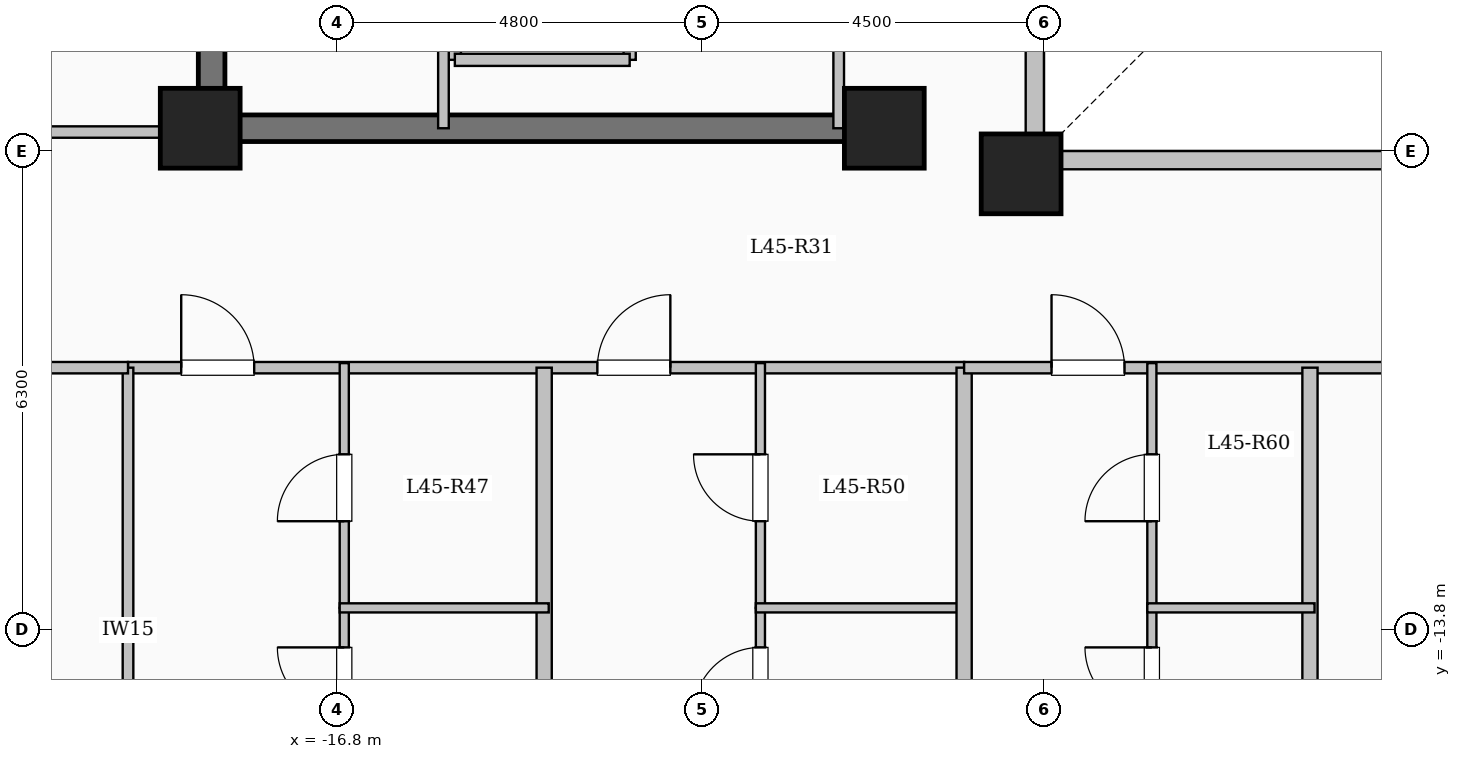
"""IFC4 building model, lengths in metres.
Left out: names, types, materials, properties, quantities, classifications, styles, units other than length and angle.
Written with IfcOpenShell. Run it as: python <this file> out.ifc"""

import sys

from ifc_helpers import new_model, si_unit, direction, frame, frame_2d, origin, origin_2d, place, context, subcontext, project, spatial, rectangle, extrude, element, fill, save


model = new_model("IFC4")
c1 = context("Model", 3, precision=1e-05, world=origin(), true_north=direction((0.0, 1.0)))
c2 = subcontext(c1, "Body", "Model", "MODEL_VIEW")
j1 = project(units=[si_unit("LENGTHUNIT", "METRE"), si_unit("PLANEANGLEUNIT", "RADIAN")], contexts=[c1])
p1 = place(None, origin())
s1 = spatial("IfcSite", under=j1, at=p1, CompositionType="ELEMENT")
p2 = place(p1, origin())
s2 = spatial("IfcBuilding", under=s1, at=p2, CompositionType="ELEMENT")
p3 = place(p2, frame((0.0, 0.0, 166.1)))
s3 = spatial("IfcBuildingStorey", under=s2, at=p3, CompositionType="ELEMENT", Elevation=166.1)
for number, where, z_axis, x_axis in (
    (1, (-7.8, -7.8, 0.0), (0.0, 0.0, 1.0), (1.0, 0.0, 0.0)),
    (2, (-9.6, -7.2, 0.0), (0.0, 0.0, 1.0), (1.0, 0.0, 0.0)),
    (3, (-18.6, -7.2, 0.0), (0.0, 0.0, 1.0), (1.0, 0.0, 0.0)),
):
    element("IfcColumn", number, at=place(p3, frame(where, z_axis=z_axis, x_axis=x_axis)), inside=s3, PredefinedType="COLUMN", context=c2, shape_type="SweptSolid", body=[
        extrude(rectangle(XDim=1.05, YDim=1.05, at=origin_2d()), origin(), (0.0, 0.0, 1.0), 3.35),
    ])
p4 = place(p3, frame((-7.62, -7.62, 0.0), z_axis=(0.0, 0.0, 1.0), x_axis=(1.0, 0.0, 0.0)))
e4 = element("IfcWall", 4, at=p4, inside=s3, PredefinedType="SOLIDWALL", context=c2, shape_type="SweptSolid", body=[
    extrude(rectangle(XDim=15.24, YDim=0.24, at=frame_2d((7.62, 0.0))), origin(), (0.0, 0.0, 1.0), 3.1),
])
p5 = place(p4, frame((6.92, 0.0, 0.95)))
e5 = element("IfcOpeningElement", 5, at=p5, cuts=e4, PredefinedType="OPENING", context=c2, shape_type="SweptSolid", body=[
    extrude(rectangle(XDim=1.4, YDim=1.5, at=frame_2d((0.7, 0.75))), frame((0.0, 0.13, 0.0), z_axis=(0.0, -1.0, 0.0), x_axis=(1.0, 0.0, 0.0)), (0.0, 0.0, 1.0), 0.26),
])
p6 = place(p3, frame((-7.62, 7.62, 0.0), z_axis=(0.0, 0.0, 1.0), x_axis=(0.0, -1.0, 0.0)))
e6 = element("IfcWall", 6, at=p6, inside=s3, PredefinedType="SOLIDWALL", context=c2, shape_type="SweptSolid", body=[
    extrude(rectangle(XDim=15.24, YDim=0.24, at=frame_2d((7.62, 0.0))), origin(), (0.0, 0.0, 1.0), 3.1),
])
p7 = place(p6, frame((6.92, 0.0, 0.95)))
e7 = element("IfcOpeningElement", 7, at=p7, cuts=e6, PredefinedType="OPENING", context=c2, shape_type="SweptSolid", body=[
    extrude(rectangle(XDim=1.4, YDim=1.5, at=frame_2d((0.7, 0.75))), frame((0.0, 0.13, 0.0), z_axis=(0.0, -1.0, 0.0), x_axis=(1.0, 0.0, 0.0)), (0.0, 0.0, 1.0), 0.26),
])
for number, where, z_axis, x_axis in (
    (8, (-15.25, -6.3, 0.0), (0.0, 0.0, 1.0), (0.0, 1.0, 0.0)),
    (9, (-12.95, -6.3, 0.0), (0.0, 0.0, 1.0), (0.0, 1.0, 0.0)),
):
    element("IfcWall", number, at=place(p3, frame(where, z_axis=z_axis, x_axis=x_axis)), inside=s3, PredefinedType="SOLIDWALL", context=c2, shape_type="SweptSolid", body=[
        extrude(rectangle(XDim=2.6, YDim=0.16, at=frame_2d((1.3, 0.0))), origin(), (0.0, 0.0, 1.0), 3.1),
    ])
p8 = place(p3, frame((-15.25, -6.3, 0.0), z_axis=(0.0, 0.0, 1.0), x_axis=(1.0, 0.0, 0.0)))
e10 = element("IfcWall", 10, at=p8, inside=s3, PredefinedType="SOLIDWALL", context=c2, shape_type="SweptSolid", body=[
    extrude(rectangle(XDim=2.3, YDim=0.16, at=frame_2d((1.15, 0.0))), origin(), (0.0, 0.0, 1.0), 3.1),
])
p9 = place(p3, frame((-18.45, -7.375, 0.0), z_axis=(0.0, 0.0, 1.0), x_axis=(0.0, 1.0, 0.0)))
e11 = element("IfcWall", 11, at=p9, inside=s3, PredefinedType="SHEAR", context=c2, shape_type="SweptSolid", body=[
    extrude(rectangle(XDim=14.05, YDim=0.35, at=frame_2d((7.025, 0.0))), origin(), (0.0, 0.0, 1.0), 3.35),
])
p10 = place(p3, frame((-18.625, -7.2, 0.0), z_axis=(0.0, 0.0, 1.0), x_axis=(1.0, 0.0, 0.0)))
e12 = element("IfcWall", 12, at=p10, inside=s3, PredefinedType="SHEAR", context=c2, shape_type="SweptSolid", body=[
    extrude(rectangle(XDim=8.55, YDim=0.35, at=frame_2d((4.275, 0.0))), origin(), (0.0, 0.0, 1.0), 3.35),
])
p11 = place(p3, frame((-15.4, -7.2, 0.0), z_axis=(0.0, 0.0, 1.0), x_axis=(0.0, 1.0, 0.0)))
e13 = element("IfcWall", 13, at=p11, inside=s3, PredefinedType="PARTITIONING", context=c2, shape_type="SweptSolid", body=[
    extrude(rectangle(XDim=10.45, YDim=0.14, at=frame_2d((5.225, 0.0))), origin(), (0.0, 0.0, 1.0), 3.1),
])
p12 = place(p11, frame((9.25, 0.0, 0.0)))
e14 = element("IfcOpeningElement", 14, at=p12, cuts=e13, PredefinedType="OPENING", context=c2, shape_type="SweptSolid", body=[
    extrude(rectangle(XDim=0.9, YDim=2.08, at=frame_2d((0.45, 1.04))), frame((0.0, 0.08, 0.0), z_axis=(0.0, -1.0, 0.0), x_axis=(1.0, 0.0, 0.0)), (0.0, 0.0, 1.0), 0.16),
])
p13 = place(p3, frame((-10.2, -7.2, 0.0), z_axis=(0.0, 0.0, 1.0), x_axis=(0.0, 1.0, 0.0)))
e15 = element("IfcWall", 15, at=p13, inside=s3, PredefinedType="PARTITIONING", context=c2, shape_type="SweptSolid", body=[
    extrude(rectangle(XDim=9.12, YDim=0.14, at=frame_2d((4.56, 0.0))), origin(), (0.0, 0.0, 1.0), 3.1),
])
p14 = place(p13, frame((1.9, 0.0, 0.0)))
e16 = element("IfcOpeningElement", 16, at=p14, cuts=e15, PredefinedType="OPENING", context=c2, shape_type="SweptSolid", body=[
    extrude(rectangle(XDim=0.95, YDim=2.12, at=frame_2d((0.475, 1.06))), frame((0.0, 0.08, 0.0), z_axis=(0.0, -1.0, 0.0), x_axis=(1.0, 0.0, 0.0)), (0.0, 0.0, 1.0), 0.16),
])
p15 = place(p13, frame((5.8, 0.0, 0.0)))
e17 = element("IfcOpeningElement", 17, at=p15, cuts=e15, PredefinedType="OPENING", context=c2, shape_type="SweptSolid", body=[
    extrude(rectangle(XDim=0.95, YDim=2.12, at=frame_2d((0.475, 1.06))), frame((0.0, 0.08, 0.0), z_axis=(0.0, -1.0, 0.0), x_axis=(1.0, 0.0, 0.0)), (0.0, 0.0, 1.0), 0.16),
])
p16 = place(p3, frame((-19.55, -10.35, 0.0), z_axis=(0.0, 0.0, 1.0), x_axis=(1.0, 0.0, 0.0)))
e18 = element("IfcWall", 18, at=p16, inside=s3, PredefinedType="PARTITIONING", context=c2, shape_type="SweptSolid", body=[
    extrude(rectangle(XDim=11.0, YDim=0.15, at=frame_2d((5.5, 0.0))), origin(), (0.0, 0.0, 1.0), 3.1),
])
p17 = place(p16, frame((0.7, 0.0, 0.0)))
e19 = element("IfcOpeningElement", 19, at=p17, cuts=e18, PredefinedType="OPENING", context=c2, shape_type="SweptSolid", body=[
    extrude(rectangle(XDim=0.96, YDim=2.15, at=frame_2d((0.48, 1.075))), frame((0.0, 0.085, 0.0), z_axis=(0.0, -1.0, 0.0), x_axis=(1.0, 0.0, 0.0)), (0.0, 0.0, 1.0), 0.17),
])
p18 = place(p16, frame((6.175, 0.0, 0.0)))
e20 = element("IfcOpeningElement", 20, at=p18, cuts=e18, PredefinedType="OPENING", context=c2, shape_type="SweptSolid", body=[
    extrude(rectangle(XDim=0.96, YDim=2.15, at=frame_2d((0.48, 1.075))), frame((0.0, 0.085, 0.0), z_axis=(0.0, -1.0, 0.0), x_axis=(1.0, 0.0, 0.0)), (0.0, 0.0, 1.0), 0.17),
])
p19 = place(p3, frame((-14.075, -21.2, 0.0), z_axis=(0.0, 0.0, 1.0), x_axis=(0.0, 1.0, 0.0)))
e21 = element("IfcWall", 21, at=p19, inside=s3, PredefinedType="SOLIDWALL", context=c2, shape_type="SweptSolid", body=[
    extrude(rectangle(XDim=10.85, YDim=0.2, at=frame_2d((5.425, 0.0))), origin(), (0.0, 0.0, 1.0), 3.1),
])
p20 = place(p3, frame((-16.705, -21.2, 0.0), z_axis=(0.0, 0.0, 1.0), x_axis=(0.0, 1.0, 0.0)))
e22 = element("IfcWall", 22, at=p20, inside=s3, PredefinedType="PARTITIONING", context=c2, shape_type="SweptSolid", body=[
    extrude(rectangle(XDim=7.69, YDim=0.12, at=frame_2d((3.845, 0.0))), origin(), (0.0, 0.0, 1.0), 3.1),
])
p21 = place(p20, frame((6.29, 0.0, 0.0)))
e23 = element("IfcOpeningElement", 23, at=p21, cuts=e22, PredefinedType="OPENING", context=c2, shape_type="SweptSolid", body=[
    extrude(rectangle(XDim=0.88, YDim=2.1, at=frame_2d((0.44, 1.05))), frame((0.0, 0.07, 0.0), z_axis=(0.0, -1.0, 0.0), x_axis=(1.0, 0.0, 0.0)), (0.0, 0.0, 1.0), 0.14),
])
p22 = place(p3, frame((-16.705, -13.51, 0.0), z_axis=(0.0, 0.0, 1.0), x_axis=(0.0, 1.0, 0.0)))
e24 = element("IfcWall", 24, at=p22, inside=s3, PredefinedType="PARTITIONING", context=c2, shape_type="SweptSolid", body=[
    extrude(rectangle(XDim=3.22, YDim=0.12, at=frame_2d((1.61, 0.0))), origin(), (0.0, 0.0, 1.0), 3.1),
])
p23 = place(p22, frame((1.14, 0.0, 0.0)))
e25 = element("IfcOpeningElement", 25, at=p23, cuts=e24, PredefinedType="OPENING", context=c2, shape_type="SweptSolid", body=[
    extrude(rectangle(XDim=0.88, YDim=2.1, at=frame_2d((0.44, 1.05))), frame((0.0, 0.07, 0.0), z_axis=(0.0, -1.0, 0.0), x_axis=(1.0, 0.0, 0.0)), (0.0, 0.0, 1.0), 0.14),
])
p24 = place(p3, frame((-16.765, -13.51, 0.0), z_axis=(0.0, 0.0, 1.0), x_axis=(1.0, 0.0, 0.0)))
e26 = element("IfcWall", 26, at=p24, inside=s3, PredefinedType="PARTITIONING", context=c2, shape_type="SweptSolid", body=[
    extrude(rectangle(XDim=2.75, YDim=0.12, at=frame_2d((1.375, 0.0))), origin(), (0.0, 0.0, 1.0), 3.1),
])
p25 = place(p3, frame((-11.23, -21.2, 0.0), z_axis=(0.0, 0.0, 1.0), x_axis=(0.0, 1.0, 0.0)))
e27 = element("IfcWall", 27, at=p25, inside=s3, PredefinedType="PARTITIONING", context=c2, shape_type="SweptSolid", body=[
    extrude(rectangle(XDim=7.69, YDim=0.12, at=frame_2d((3.845, 0.0))), origin(), (0.0, 0.0, 1.0), 3.1),
])
p26 = place(p25, frame((6.29, 0.0, 0.0)))
e28 = element("IfcOpeningElement", 28, at=p26, cuts=e27, PredefinedType="OPENING", context=c2, shape_type="SweptSolid", body=[
    extrude(rectangle(XDim=0.88, YDim=2.1, at=frame_2d((0.44, 1.05))), frame((0.0, 0.07, 0.0), z_axis=(0.0, -1.0, 0.0), x_axis=(1.0, 0.0, 0.0)), (0.0, 0.0, 1.0), 0.14),
])
p27 = place(p3, frame((-11.23, -13.51, 0.0), z_axis=(0.0, 0.0, 1.0), x_axis=(0.0, 1.0, 0.0)))
e29 = element("IfcWall", 29, at=p27, inside=s3, PredefinedType="PARTITIONING", context=c2, shape_type="SweptSolid", body=[
    extrude(rectangle(XDim=3.22, YDim=0.12, at=frame_2d((1.61, 0.0))), origin(), (0.0, 0.0, 1.0), 3.1),
])
p28 = place(p27, frame((1.14, 0.0, 0.0)))
e30 = element("IfcOpeningElement", 30, at=p28, cuts=e29, PredefinedType="OPENING", context=c2, shape_type="SweptSolid", body=[
    extrude(rectangle(XDim=0.88, YDim=2.1, at=frame_2d((0.44, 1.05))), frame((0.0, 0.07, 0.0), z_axis=(0.0, -1.0, 0.0), x_axis=(1.0, 0.0, 0.0)), (0.0, 0.0, 1.0), 0.14),
])
p29 = place(p3, frame((-11.29, -13.51, 0.0), z_axis=(0.0, 0.0, 1.0), x_axis=(1.0, 0.0, 0.0)))
e31 = element("IfcWall", 31, at=p29, inside=s3, PredefinedType="PARTITIONING", context=c2, shape_type="SweptSolid", body=[
    extrude(rectangle(XDim=2.75, YDim=0.12, at=frame_2d((1.375, 0.0))), origin(), (0.0, 0.0, 1.0), 3.1),
])
p30 = place(p3, frame((-8.55, -21.804, 0.0), z_axis=(0.0, 0.0, 1.0), x_axis=(0.0, 1.0, 0.0)))
e32 = element("IfcWall", 32, at=p30, inside=s3, PredefinedType="SOLIDWALL", context=c2, shape_type="SweptSolid", body=[
    extrude(rectangle(XDim=11.454, YDim=0.2, at=frame_2d((5.727, 0.0))), origin(), (0.0, 0.0, 1.0), 3.1),
])
p31 = place(p3, frame((-8.55, -10.35, 0.0), z_axis=(0.0, 0.0, 1.0), x_axis=(1.0, 0.0, 0.0)))
e33 = element("IfcWall", 33, at=p31, inside=s3, PredefinedType="PARTITIONING", context=c2, shape_type="SweptSolid", body=[
    extrude(rectangle(XDim=17.1, YDim=0.15, at=frame_2d((8.55, 0.0))), origin(), (0.0, 0.0, 1.0), 3.1),
])
p32 = place(p31, frame((1.15, 0.0, 0.0)))
e34 = element("IfcOpeningElement", 34, at=p32, cuts=e33, PredefinedType="OPENING", context=c2, shape_type="SweptSolid", body=[
    extrude(rectangle(XDim=0.96, YDim=2.15, at=frame_2d((0.48, 1.075))), frame((0.0, 0.085, 0.0), z_axis=(0.0, -1.0, 0.0), x_axis=(1.0, 0.0, 0.0)), (0.0, 0.0, 1.0), 0.17),
])
p33 = place(p31, frame((10.5, 0.0, 0.0)))
e35 = element("IfcOpeningElement", 35, at=p33, cuts=e33, PredefinedType="OPENING", context=c2, shape_type="SweptSolid", body=[
    extrude(rectangle(XDim=0.96, YDim=2.15, at=frame_2d((0.48, 1.075))), frame((0.0, 0.085, 0.0), z_axis=(0.0, -1.0, 0.0), x_axis=(1.0, 0.0, 0.0)), (0.0, 0.0, 1.0), 0.17),
])
p34 = place(p3, frame((-4.0, -21.15, 0.0), z_axis=(0.0, 0.0, 1.0), x_axis=(0.0, 1.0, 0.0)))
e36 = element("IfcWall", 36, at=p34, inside=s3, PredefinedType="SOLIDWALL", context=c2, shape_type="SweptSolid", body=[
    extrude(rectangle(XDim=10.8, YDim=0.2, at=frame_2d((5.4, 0.0))), origin(), (0.0, 0.0, 1.0), 3.1),
])
p35 = place(p3, frame((-6.08, -22.414, 0.0), z_axis=(0.0, 0.0, 1.0), x_axis=(0.0, 1.0, 0.0)))
e37 = element("IfcWall", 37, at=p35, inside=s3, PredefinedType="PARTITIONING", context=c2, shape_type="SweptSolid", body=[
    extrude(rectangle(XDim=8.904, YDim=0.12, at=frame_2d((4.452, 0.0))), origin(), (0.0, 0.0, 1.0), 3.1),
])
p36 = place(p35, frame((7.504, 0.0, 0.0)))
e38 = element("IfcOpeningElement", 38, at=p36, cuts=e37, PredefinedType="OPENING", context=c2, shape_type="SweptSolid", body=[
    extrude(rectangle(XDim=0.88, YDim=2.1, at=frame_2d((0.44, 1.05))), frame((0.0, 0.07, 0.0), z_axis=(0.0, -1.0, 0.0), x_axis=(1.0, 0.0, 0.0)), (0.0, 0.0, 1.0), 0.14),
])
p37 = place(p3, frame((-6.08, -13.51, 0.0), z_axis=(0.0, 0.0, 1.0), x_axis=(0.0, 1.0, 0.0)))
e39 = element("IfcWall", 39, at=p37, inside=s3, PredefinedType="PARTITIONING", context=c2, shape_type="SweptSolid", body=[
    extrude(rectangle(XDim=3.22, YDim=0.12, at=frame_2d((1.61, 0.0))), origin(), (0.0, 0.0, 1.0), 3.1),
])
p38 = place(p37, frame((1.14, 0.0, 0.0)))
e40 = element("IfcOpeningElement", 40, at=p38, cuts=e39, PredefinedType="OPENING", context=c2, shape_type="SweptSolid", body=[
    extrude(rectangle(XDim=0.88, YDim=2.1, at=frame_2d((0.44, 1.05))), frame((0.0, 0.07, 0.0), z_axis=(0.0, -1.0, 0.0), x_axis=(1.0, 0.0, 0.0)), (0.0, 0.0, 1.0), 0.14),
])
p39 = place(p3, frame((-6.14, -13.51, 0.0), z_axis=(0.0, 0.0, 1.0), x_axis=(1.0, 0.0, 0.0)))
e41 = element("IfcWall", 41, at=p39, inside=s3, PredefinedType="PARTITIONING", context=c2, shape_type="SweptSolid", body=[
    extrude(rectangle(XDim=2.2, YDim=0.12, at=frame_2d((1.1, 0.0))), origin(), (0.0, 0.0, 1.0), 3.1),
])
p40 = place(p3, frame((-25.08, -7.25, 0.0), z_axis=(0.0, 0.0, 1.0), x_axis=(1.0, 0.0, 0.0)))
e42 = element("IfcWall", 42, at=p40, inside=s3, PredefinedType="PARTITIONING", context=c2, shape_type="SweptSolid", body=[
    extrude(rectangle(XDim=6.63, YDim=0.15, at=frame_2d((3.315, 0.0))), origin(), (0.0, 0.0, 1.0), 3.1),
])
p41 = place(p40, frame((3.53, 0.0, 0.0)))
e43 = element("IfcOpeningElement", 43, at=p41, cuts=e42, PredefinedType="OPENING", context=c2, shape_type="SweptSolid", body=[
    extrude(rectangle(XDim=0.96, YDim=2.15, at=frame_2d((0.48, 1.075))), frame((0.0, 0.085, 0.0), z_axis=(0.0, -1.0, 0.0), x_axis=(1.0, 0.0, 0.0)), (0.0, 0.0, 1.0), 0.17),
])
p42 = place(p3, frame((-19.55, -17.25, 0.0), z_axis=(0.0, 0.0, 1.0), x_axis=(0.0, 1.0, 0.0)))
e44 = element("IfcWall", 44, at=p42, inside=s3, PredefinedType="PARTITIONING", context=c2, shape_type="SweptSolid", body=[
    extrude(rectangle(XDim=6.9, YDim=0.14, at=frame_2d((3.45, 0.0))), origin(), (0.0, 0.0, 1.0), 3.1),
])
p43 = place(p3, frame((-25.08, -10.35, 0.0), z_axis=(0.0, 0.0, 1.0), x_axis=(1.0, 0.0, 0.0)))
e45 = element("IfcWall", 45, at=p43, inside=s3, PredefinedType="PARTITIONING", context=c2, shape_type="SweptSolid", body=[
    extrude(rectangle(XDim=5.53, YDim=0.15, at=frame_2d((2.765, 0.0))), origin(), (0.0, 0.0, 1.0), 3.1),
])
p44 = place(p43, frame((2.29, 0.0, 0.0)))
e46 = element("IfcOpeningElement", 46, at=p44, cuts=e45, PredefinedType="OPENING", context=c2, shape_type="SweptSolid", body=[
    extrude(rectangle(XDim=0.95, YDim=2.15, at=frame_2d((0.475, 1.075))), frame((0.0, 0.085, 0.0), z_axis=(0.0, -1.0, 0.0), x_axis=(1.0, 0.0, 0.0)), (0.0, 0.0, 1.0), 0.17),
])
p45 = place(p17, origin())
e47 = element("IfcDoor", 47, at=p45, inside=s3, OperationType="SINGLE_SWING_LEFT", PredefinedType="DOOR", context=c2, shape_type="SweptSolid", body=[
    extrude(rectangle(XDim=0.96, YDim=2.15, at=frame_2d((0.48, 1.075))), frame((0.0, 0.025, 0.0), z_axis=(0.0, -1.0, 0.0), x_axis=(1.0, 0.0, 0.0)), (0.0, 0.0, 1.0), 0.05),
])
fill(e19, e47)
p46 = place(p21, origin())
e48 = element("IfcDoor", 48, at=p46, inside=s3, OperationType="SINGLE_SWING_RIGHT", PredefinedType="DOOR", context=c2, shape_type="SweptSolid", body=[
    extrude(rectangle(XDim=0.88, YDim=2.1, at=frame_2d((0.44, 1.05))), frame((0.0, 0.025, 0.0), z_axis=(0.0, -1.0, 0.0), x_axis=(1.0, 0.0, 0.0)), (0.0, 0.0, 1.0), 0.05),
])
fill(e23, e48)
p47 = place(p23, origin())
e49 = element("IfcDoor", 49, at=p47, inside=s3, OperationType="SINGLE_SWING_LEFT", PredefinedType="DOOR", context=c2, shape_type="SweptSolid", body=[
    extrude(rectangle(XDim=0.88, YDim=2.1, at=frame_2d((0.44, 1.05))), frame((0.0, 0.025, 0.0), z_axis=(0.0, -1.0, 0.0), x_axis=(1.0, 0.0, 0.0)), (0.0, 0.0, 1.0), 0.05),
])
fill(e25, e49)
p48 = place(p18, origin())
e50 = element("IfcDoor", 50, at=p48, inside=s3, OperationType="SINGLE_SWING_RIGHT", PredefinedType="DOOR", context=c2, shape_type="SweptSolid", body=[
    extrude(rectangle(XDim=0.96, YDim=2.15, at=frame_2d((0.48, 1.075))), frame((0.0, 0.025, 0.0), z_axis=(0.0, -1.0, 0.0), x_axis=(1.0, 0.0, 0.0)), (0.0, 0.0, 1.0), 0.05),
])
fill(e20, e50)
p49 = place(p26, origin())
e51 = element("IfcDoor", 51, at=p49, inside=s3, OperationType="SINGLE_SWING_LEFT", PredefinedType="DOOR", context=c2, shape_type="SweptSolid", body=[
    extrude(rectangle(XDim=0.88, YDim=2.1, at=frame_2d((0.44, 1.05))), frame((0.0, 0.025, 0.0), z_axis=(0.0, -1.0, 0.0), x_axis=(1.0, 0.0, 0.0)), (0.0, 0.0, 1.0), 0.05),
])
fill(e28, e51)
p50 = place(p28, origin())
e52 = element("IfcDoor", 52, at=p50, inside=s3, OperationType="SINGLE_SWING_RIGHT", PredefinedType="DOOR", context=c2, shape_type="SweptSolid", body=[
    extrude(rectangle(XDim=0.88, YDim=2.1, at=frame_2d((0.44, 1.05))), frame((0.0, 0.025, 0.0), z_axis=(0.0, -1.0, 0.0), x_axis=(1.0, 0.0, 0.0)), (0.0, 0.0, 1.0), 0.05),
])
fill(e30, e52)
p51 = place(p32, origin())
e53 = element("IfcDoor", 53, at=p51, inside=s3, OperationType="SINGLE_SWING_LEFT", PredefinedType="DOOR", context=c2, shape_type="SweptSolid", body=[
    extrude(rectangle(XDim=0.96, YDim=2.15, at=frame_2d((0.48, 1.075))), frame((0.0, 0.025, 0.0), z_axis=(0.0, -1.0, 0.0), x_axis=(1.0, 0.0, 0.0)), (0.0, 0.0, 1.0), 0.05),
])
fill(e34, e53)
p52 = place(p36, origin())
e54 = element("IfcDoor", 54, at=p52, inside=s3, OperationType="SINGLE_SWING_RIGHT", PredefinedType="DOOR", context=c2, shape_type="SweptSolid", body=[
    extrude(rectangle(XDim=0.88, YDim=2.1, at=frame_2d((0.44, 1.05))), frame((0.0, 0.025, 0.0), z_axis=(0.0, -1.0, 0.0), x_axis=(1.0, 0.0, 0.0)), (0.0, 0.0, 1.0), 0.05),
])
fill(e38, e54)
p53 = place(p38, origin())
e55 = element("IfcDoor", 55, at=p53, inside=s3, OperationType="SINGLE_SWING_LEFT", PredefinedType="DOOR", context=c2, shape_type="SweptSolid", body=[
    extrude(rectangle(XDim=0.88, YDim=2.1, at=frame_2d((0.44, 1.05))), frame((0.0, 0.025, 0.0), z_axis=(0.0, -1.0, 0.0), x_axis=(1.0, 0.0, 0.0)), (0.0, 0.0, 1.0), 0.05),
])
fill(e40, e55)
save(model, sys.argv[1])
